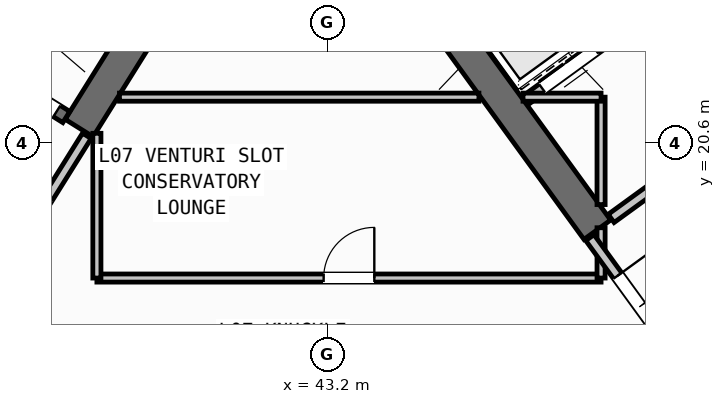
"""IFC4 building model, lengths in metres.
Left out: names, types, materials, properties, quantities, classifications, styles, units other than length and angle.
Written with IfcOpenShell. Run it as: python <this file> out.ifc"""

import sys

from ifc_helpers import new_model, si_unit, direction, frame, frame_2d, origin, place, context, subcontext, project, spatial, rectangle, extrude, source, transform, mapped, element, fill, save


model = new_model("IFC4")
c1 = context("Model", 3, precision=1e-05, world=origin(), true_north=direction((0.0, 1.0)))
c2 = subcontext(c1, "Body", "Model", "MODEL_VIEW")
j1 = project(units=[si_unit("LENGTHUNIT", "METRE"), si_unit("PLANEANGLEUNIT", "RADIAN")], contexts=[c1])
p1 = place(None, origin())
s1 = spatial("IfcSite", under=j1, at=p1, CompositionType="ELEMENT")
p2 = place(p1, origin())
s2 = spatial("IfcBuilding", under=s1, at=p2, CompositionType="ELEMENT")
p3 = place(p2, frame((0.0, 0.0, 31.2)))
s3 = spatial("IfcBuildingStorey", under=s2, at=p3, CompositionType="ELEMENT", Elevation=31.2)
p4 = place(p3, frame((40.168, 23.88, 0.0), z_axis=(0.0, 0.0, 1.0), x_axis=(-0.529893103397, -0.8480644427, 0.0)))
e1 = element("IfcWall", 1, at=p4, inside=s3, PredefinedType="SHEAR", context=c2, shape_type="SweptSolid", body=[
    extrude(rectangle(XDim=3.525, YDim=0.65, at=frame_2d((1.763, 0.0))), origin(), (0.0, 0.0, 1.0), 3.35),
])
p5 = place(p3, frame((48.526, 18.884, 0.0), z_axis=(0.0, 0.0, 1.0), x_axis=(-0.58777996584, 0.809020835181, 0.0)))
e2 = element("IfcWall", 2, at=p5, inside=s3, PredefinedType="SHEAR", context=c2, shape_type="SweptSolid", body=[
    extrude(rectangle(XDim=6.375, YDim=0.65, at=frame_2d((3.188, 0.0))), origin(), (0.0, 0.0, 1.0), 3.35),
])
p6 = place(p3, frame((38.046, 21.108, 0.0), z_axis=(0.0, 0.0, 1.0), x_axis=(-0.848054434086, 0.529909121291, 0.0)))
e3 = element("IfcWall", 3, at=p6, inside=s3, PredefinedType="SHEAR", context=c2, shape_type="SweptSolid", body=[
    extrude(rectangle(XDim=7.33, YDim=0.26, at=frame_2d((3.665, 0.0))), origin(), (0.0, 0.0, 1.0), 3.35),
])
p7 = place(p6, frame((0.22, 0.0, 0.0)))
e4 = element("IfcOpeningElement", 4, at=p7, cuts=e3, PredefinedType="OPENING", context=c2, shape_type="SweptSolid", body=[
    extrude(rectangle(XDim=1.1, YDim=2.1, at=frame_2d((0.55, 1.05))), frame((0.0, 0.14, 0.0), z_axis=(0.0, -1.0, 0.0), x_axis=(1.0, 0.0, 0.0)), (0.0, 0.0, 1.0), 0.28),
])
p8 = place(p3, frame((47.106, 21.437, 0.0), z_axis=(0.0, 0.0, 1.0), x_axis=(0.809012514015, 0.58779141893, 0.0)))
e5 = element("IfcWall", 5, at=p8, inside=s3, PredefinedType="STANDARD", context=c2, shape_type="SweptSolid", body=[
    extrude(rectangle(XDim=3.398, YDim=0.2, at=frame_2d((1.699, 0.0))), origin(), (0.0, 0.0, 1.0), 3.34),
])
p9 = place(p8, frame((0.408, 0.0, 0.0)))
e6 = element("IfcOpeningElement", 6, at=p9, cuts=e5, PredefinedType="OPENING", context=c2, shape_type="SweptSolid", body=[
    extrude(rectangle(XDim=1.3, YDim=2.2, at=frame_2d((0.65, 1.1))), frame((0.0, 0.11, 0.0), z_axis=(0.0, -1.0, 0.0), x_axis=(1.0, 0.0, 0.0)), (0.0, 0.0, 1.0), 0.22),
])
p10 = place(p3, frame((48.799, 19.107, 0.0), z_axis=(0.0, 0.0, 1.0), x_axis=(0.809012959416, 0.587790805897, 0.0)))
e7 = element("IfcWall", 7, at=p10, inside=s3, PredefinedType="STANDARD", context=c2, shape_type="SweptSolid", body=[
    extrude(rectangle(XDim=5.718, YDim=0.2, at=frame_2d((2.859, 0.0))), origin(), (0.0, 0.0, 1.0), 3.34),
])
p11 = place(p10, frame((2.498, 0.0, 0.0)))
e8 = element("IfcOpeningElement", 8, at=p11, cuts=e7, PredefinedType="OPENING", context=c2, shape_type="SweptSolid", body=[
    extrude(rectangle(XDim=1.15, YDim=2.1, at=frame_2d((0.575, 1.05))), frame((0.0, 0.11, 0.0), z_axis=(0.0, -1.0, 0.0), x_axis=(1.0, 0.0, 0.0)), (0.0, 0.0, 1.0), 0.22),
])
p12 = place(p3, frame((38.451, 20.737, 0.0), z_axis=(0.0, 0.0, 1.0), x_axis=(-0.529924799939, -0.848044637038, 0.0)))
e9 = element("IfcWall", 9, at=p12, inside=s3, PredefinedType="STANDARD", context=c2, shape_type="SweptSolid", body=[
    extrude(rectangle(XDim=2.96, YDim=0.2, at=frame_2d((1.48, 0.0))), origin(), (0.0, 0.0, 1.0), 3.34),
])
p13 = place(p12, frame((1.46, 0.0, 0.0)))
e10 = element("IfcOpeningElement", 10, at=p13, cuts=e9, PredefinedType="OPENING", context=c2, shape_type="SweptSolid", body=[
    extrude(rectangle(XDim=0.86, YDim=2.05, at=frame_2d((0.43, 1.025))), frame((0.0, 0.11, 0.0), z_axis=(0.0, -1.0, 0.0), x_axis=(1.0, 0.0, 0.0)), (0.0, 0.0, 1.0), 0.22),
])
p14 = place(p3, frame((38.65, 17.93, 0.0), z_axis=(0.0, 0.0, 1.0), x_axis=(1.0, 0.0, 0.0)))
e11 = element("IfcWall", 11, at=p14, inside=s3, PredefinedType="PARTITIONING", context=c2, shape_type="SweptSolid", body=[
    extrude(rectangle(XDim=9.95, YDim=0.16, at=frame_2d((4.975, 0.0))), origin(), (0.0, 0.0, 1.0), 3.34),
])
p15 = place(p14, frame((4.475, 0.0, 0.0)))
e12 = element("IfcOpeningElement", 12, at=p15, cuts=e11, PredefinedType="OPENING", context=c2, shape_type="SweptSolid", body=[
    extrude(rectangle(XDim=1.0, YDim=2.1, at=frame_2d((0.5, 1.05))), frame((0.0, 0.09, 0.0), z_axis=(0.0, -1.0, 0.0), x_axis=(1.0, 0.0, 0.0)), (0.0, 0.0, 1.0), 0.18),
])
p16 = place(p3, frame((38.65, 17.93, 0.0), z_axis=(0.0, 0.0, 1.0), x_axis=(0.0, 1.0, 0.0)))
e13 = element("IfcWall", 13, at=p16, inside=s3, PredefinedType="PARTITIONING", context=c2, shape_type="SweptSolid", body=[
    extrude(rectangle(XDim=2.857, YDim=0.16, at=frame_2d((1.428, 0.0))), origin(), (0.0, 0.0, 1.0), 3.34),
])
p17 = place(p3, frame((48.6, 17.93, 0.0), z_axis=(0.0, 0.0, 1.0), x_axis=(0.0, 1.0, 0.0)))
e14 = element("IfcWall", 14, at=p17, inside=s3, PredefinedType="PARTITIONING", context=c2, shape_type="SweptSolid", body=[
    extrude(rectangle(XDim=0.993, YDim=0.16, at=frame_2d((0.496, 0.0))), origin(), (0.0, 0.0, 1.0), 3.34),
])
p18 = place(p3, frame((48.6, 19.38, 0.0), z_axis=(0.0, 0.0, 1.0), x_axis=(0.0, 1.0, 0.0)))
e15 = element("IfcWall", 15, at=p18, inside=s3, PredefinedType="PARTITIONING", context=c2, shape_type="SweptSolid", body=[
    extrude(rectangle(XDim=2.12, YDim=0.16, at=frame_2d((1.06, 0.0))), origin(), (0.0, 0.0, 1.0), 3.34),
])
p19 = place(p3, frame((39.095, 21.5, 0.0), z_axis=(0.0, 0.0, 1.0), x_axis=(1.0, 0.0, 0.0)))
e16 = element("IfcWall", 16, at=p19, inside=s3, PredefinedType="PARTITIONING", context=c2, shape_type="SweptSolid", body=[
    extrude(rectangle(XDim=7.094, YDim=0.16, at=frame_2d((3.547, 0.0))), origin(), (0.0, 0.0, 1.0), 3.34),
])
p20 = place(p3, frame((47.06, 21.5, 0.0), z_axis=(0.0, 0.0, 1.0), x_axis=(1.0, 0.0, 0.0)))
e17 = element("IfcWall", 17, at=p20, inside=s3, PredefinedType="PARTITIONING", context=c2, shape_type="SweptSolid", body=[
    extrude(rectangle(XDim=1.54, YDim=0.16, at=frame_2d((0.77, 0.0))), origin(), (0.0, 0.0, 1.0), 3.34),
])
p21 = place(p3, frame((50.119, 16.333, 0.0), z_axis=(0.0, 0.0, 1.0), x_axis=(-0.587749856981, 0.809042709391, 0.0)))
e18 = element("IfcWall", 18, at=p21, inside=s3, PredefinedType="STANDARD", context=c2, shape_type="SweptSolid", body=[
    extrude(rectangle(XDim=2.96, YDim=0.2, at=frame_2d((1.48, 0.0))), origin(), (0.0, 0.0, 1.0), 3.34),
])
p22 = place(p21, frame((0.53, 0.0, 0.0)))
e19 = element("IfcOpeningElement", 19, at=p22, cuts=e18, PredefinedType="OPENING", context=c2, shape_type="SweptSolid", body=[
    extrude(rectangle(XDim=1.5, YDim=2.15, at=frame_2d((0.75, 1.075))), frame((0.0, 0.11, 0.0), z_axis=(0.0, -1.0, 0.0), x_axis=(1.0, 0.0, 0.0)), (0.0, 0.0, 1.0), 0.22),
])
m1 = source(origin(), c2, "Body", "SweptSolid", [
    extrude(rectangle(XDim=1.1, YDim=2.1, at=frame_2d((0.55, 1.05))), frame((0.0, 0.025, 0.0), z_axis=(0.0, -1.0, 0.0), x_axis=(1.0, 0.0, 0.0)), (0.0, 0.0, 1.0), 0.05),
])
p23 = place(p7, origin())
e20 = element("IfcDoor", 20, at=p23, inside=s3, OperationType="SINGLE_SWING_RIGHT", PredefinedType="DOOR", context=c2, shape_type="MappedRepresentation", body=[
    mapped(m1, transform((0.0, 0.0, 0.0), scale=1.0)),
])
fill(e4, e20)
m2 = source(origin(), c2, "Body", "SweptSolid", [
    extrude(rectangle(XDim=1.3, YDim=2.2, at=frame_2d((0.65, 1.1))), frame((0.0, 0.025, 0.0), z_axis=(0.0, -1.0, 0.0), x_axis=(1.0, 0.0, 0.0)), (0.0, 0.0, 1.0), 0.05),
])
p24 = place(p9, origin())
e21 = element("IfcDoor", 21, at=p24, inside=s3, OperationType="DOUBLE_DOOR_SLIDING", PredefinedType="DOOR", context=c2, shape_type="MappedRepresentation", body=[
    mapped(m2, transform((0.0, 0.0, 0.0), scale=1.0)),
])
fill(e6, e21)
m3 = source(origin(), c2, "Body", "SweptSolid", [
    extrude(rectangle(XDim=1.0, YDim=2.1, at=frame_2d((0.5, 1.05))), frame((0.0, 0.025, 0.0), z_axis=(0.0, -1.0, 0.0), x_axis=(1.0, 0.0, 0.0)), (0.0, 0.0, 1.0), 0.05),
])
p25 = place(p15, origin())
e22 = element("IfcDoor", 22, at=p25, inside=s3, OperationType="SINGLE_SWING_RIGHT", PredefinedType="DOOR", context=c2, shape_type="MappedRepresentation", body=[
    mapped(m3, transform((0.0, 0.0, 0.0), scale=1.0)),
])
fill(e12, e22)
m4 = source(origin(), c2, "Body", "SweptSolid", [
    extrude(rectangle(XDim=1.5, YDim=2.15, at=frame_2d((0.75, 1.075))), frame((0.0, 0.025, 0.0), z_axis=(0.0, -1.0, 0.0), x_axis=(1.0, 0.0, 0.0)), (0.0, 0.0, 1.0), 0.05),
])
p26 = place(p22, frame((1.5, 0.0, 0.0), z_axis=(0.0, 0.0, 1.0), x_axis=(-1.0, 0.0, 0.0)))
e23 = element("IfcDoor", 23, at=p26, inside=s3, OperationType="DOUBLE_DOOR_SINGLE_SWING", PredefinedType="DOOR", context=c2, shape_type="MappedRepresentation", body=[
    mapped(m4, transform((0.0, 0.0, 0.0), scale=1.0)),
])
fill(e19, e23)
save(model, sys.argv[1])
